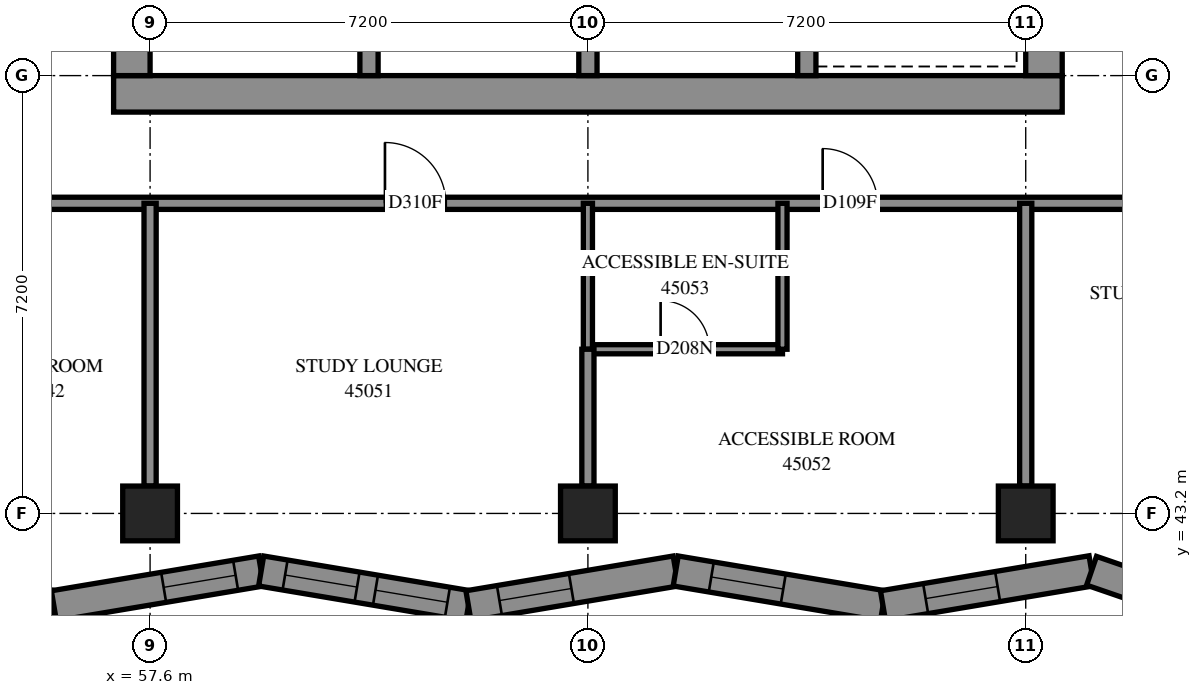
"""IFC4 building model, lengths in metres.
Left out: names, types, materials, properties, quantities, classifications, styles, units other than length and angle.
Written with IfcOpenShell. Run it as: python <this file> out.ifc"""

import sys

from ifc_helpers import new_model, si_unit, direction, frame, frame_2d, origin, origin_2d, place, context, subcontext, project, spatial, polyline, rectangle, outline, extrude, element, fill, save


model = new_model("IFC4")
c1 = context("Model", 3, precision=1e-05, world=origin(), true_north=direction((0.0, 1.0)))
c2 = subcontext(c1, "Body", "Model", "MODEL_VIEW")
j1 = project(units=[si_unit("LENGTHUNIT", "METRE"), si_unit("PLANEANGLEUNIT", "RADIAN")], contexts=[c1])
p1 = place(None, origin())
s1 = spatial("IfcSite", under=j1, at=p1, CompositionType="ELEMENT")
p2 = place(p1, origin())
s2 = spatial("IfcBuilding", under=s1, at=p2, CompositionType="ELEMENT")
p3 = place(p2, frame((0.0, 0.0, 166.0)))
s3 = spatial("IfcBuildingStorey", under=s2, at=p3, CompositionType="ELEMENT", Elevation=166.0)
for number, where, z_axis, x_axis in (
    (1, (57.6, 43.2, 0.0), (0.0, 0.0, 1.0), (1.0, 0.0, 0.0)),
    (2, (64.8, 43.2, 0.0), (0.0, 0.0, 1.0), (1.0, 0.0, 0.0)),
    (3, (72.0, 43.2, 0.0), (0.0, 0.0, 1.0), (1.0, 0.0, 0.0)),
):
    element("IfcColumn", number, at=place(p3, frame(where, z_axis=z_axis, x_axis=x_axis)), inside=s3, PredefinedType="COLUMN", context=c2, shape_type="SweptSolid", body=[
        extrude(rectangle(XDim=0.9, YDim=0.9, at=origin_2d()), origin(), (0.0, 0.0, 1.0), 3.1),
    ])
p4 = place(p3, frame((57.0, 50.1, -0.3), z_axis=(0.0, 0.0, 1.0), x_axis=(1.0, 0.0, 0.0)))
e4 = element("IfcWall", 4, at=p4, inside=s3, PredefinedType="SHEAR", context=c2, shape_type="SweptSolid", body=[
    extrude(rectangle(XDim=15.6, YDim=0.6, at=frame_2d((7.8, 0.0))), origin(), (0.0, 0.0, 1.0), 2.7),
])
p5 = place(p3, frame((57.3, 50.4, -0.3), z_axis=(0.0, 0.0, 1.0), x_axis=(0.0, 1.0, 0.0)))
e5 = element("IfcWall", 5, at=p5, inside=s3, PredefinedType="SHEAR", context=c2, shape_type="SweptSolid", body=[
    extrude(rectangle(XDim=14.4, YDim=0.6, at=frame_2d((7.2, 0.0))), origin(), (0.0, 0.0, 1.0), 2.7),
])
p6 = place(p5, frame((4.55, 0.0, 0.3)))
e6 = element("IfcOpeningElement", 6, at=p6, cuts=e5, PredefinedType="OPENING", context=c2, shape_type="SweptSolid", body=[
    extrude(rectangle(XDim=1.1, YDim=2.1, at=frame_2d((0.55, 1.05))), frame((0.0, 0.31, 0.0), z_axis=(0.0, -1.0, 0.0), x_axis=(1.0, 0.0, 0.0)), (0.0, 0.0, 1.0), 0.62),
])
p7 = place(p5, frame((11.35, 0.0, 0.3)))
e7 = element("IfcOpeningElement", 7, at=p7, cuts=e5, PredefinedType="OPENING", context=c2, shape_type="SweptSolid", body=[
    extrude(rectangle(XDim=1.1, YDim=2.1, at=frame_2d((0.55, 1.05))), frame((0.0, 0.31, 0.0), z_axis=(0.0, -1.0, 0.0), x_axis=(1.0, 0.0, 0.0)), (0.0, 0.0, 1.0), 0.62),
])
p8 = place(p3, frame((72.3, 50.4, -0.3), z_axis=(0.0, 0.0, 1.0), x_axis=(0.0, 1.0, 0.0)))
e8 = element("IfcWall", 8, at=p8, inside=s3, PredefinedType="SHEAR", context=c2, shape_type="SweptSolid", body=[
    extrude(rectangle(XDim=14.4, YDim=0.6, at=frame_2d((7.2, 0.0))), origin(), (0.0, 0.0, 1.0), 2.7),
])
p9 = place(p8, frame((4.55, 0.0, 0.3)))
e9 = element("IfcOpeningElement", 9, at=p9, cuts=e8, PredefinedType="OPENING", context=c2, shape_type="SweptSolid", body=[
    extrude(rectangle(XDim=1.1, YDim=2.1, at=frame_2d((0.55, 1.05))), frame((0.0, 0.31, 0.0), z_axis=(0.0, -1.0, 0.0), x_axis=(1.0, 0.0, 0.0)), (0.0, 0.0, 1.0), 0.62),
])
p10 = place(p8, frame((11.35, 0.0, 0.3)))
e10 = element("IfcOpeningElement", 10, at=p10, cuts=e8, PredefinedType="OPENING", context=c2, shape_type="SweptSolid", body=[
    extrude(rectangle(XDim=1.1, YDim=2.1, at=frame_2d((0.55, 1.05))), frame((0.0, 0.31, 0.0), z_axis=(0.0, -1.0, 0.0), x_axis=(1.0, 0.0, 0.0)), (0.0, 0.0, 1.0), 0.62),
])
for number, where, z_axis, x_axis in (
    (11, (61.2, 50.4, 0.0), (0.0, 0.0, 1.0), (0.0, 1.0, 0.0)),
    (12, (64.8, 50.4, 0.0), (0.0, 0.0, 1.0), (0.0, 1.0, 0.0)),
    (13, (68.4, 50.4, 0.0), (0.0, 0.0, 1.0), (0.0, 1.0, 0.0)),
):
    element("IfcWall", number, at=place(p3, frame(where, z_axis=z_axis, x_axis=x_axis)), inside=s3, PredefinedType="SOLIDWALL", context=c2, shape_type="SweptSolid", body=[
        extrude(rectangle(XDim=3.3, YDim=0.3, at=frame_2d((1.65, 0.0))), origin(), (0.0, 0.0, 1.0), 3.1),
    ])
p11 = place(p3, frame((52.588, 42.257, 0.0), z_axis=(0.0, 0.0, 1.0), x_axis=(0.9862099159, -0.16549925, 0.0)))
e14 = element("IfcWall", 14, at=p11, inside=s3, PredefinedType="SOLIDWALL", context=c2, shape_type="SweptSolid", body=[
    extrude(outline(polyline([(0.064, -0.25), (3.52, -0.25), (3.436, 0.25), (-0.064, 0.25), (0.064, -0.25)])), origin(), (0.0, 0.0, 1.0), 3.1),
])
p12 = place(p11, frame((1.734, 0.0, 0.45)))
e15 = element("IfcOpeningElement", 15, at=p12, cuts=e14, PredefinedType="OPENING", context=c2, shape_type="SweptSolid", body=[
    extrude(rectangle(XDim=1.2, YDim=2.5, at=frame_2d((0.6, 1.25))), frame((0.0, 0.26, 0.0), z_axis=(0.0, -1.0, 0.0), x_axis=(1.0, 0.0, 0.0)), (0.0, 0.0, 1.0), 0.52),
])
p13 = place(p3, frame((56.018, 41.681, 0.0), z_axis=(0.0, 0.0, 1.0), x_axis=(0.9862119159, 0.1654873316, 0.0)))
e16 = element("IfcWall", 16, at=p13, inside=s3, PredefinedType="SOLIDWALL", context=c2, shape_type="SweptSolid", body=[
    extrude(outline(polyline([(-0.042, -0.25), (3.414, -0.25), (3.498, 0.25), (0.042, 0.25), (-0.042, -0.25)])), origin(), (0.0, 0.0, 1.0), 3.1),
])
p14 = place(p13, frame((1.831, 0.0, 0.45)))
e17 = element("IfcOpeningElement", 17, at=p14, cuts=e16, PredefinedType="OPENING", context=c2, shape_type="SweptSolid", body=[
    extrude(rectangle(XDim=1.2, YDim=2.5, at=frame_2d((0.6, 1.25))), frame((0.0, 0.26, 0.0), z_axis=(0.0, -1.0, 0.0), x_axis=(1.0, 0.0, 0.0)), (0.0, 0.0, 1.0), 0.52),
])
p15 = place(p3, frame((59.426, 42.254, 0.0), z_axis=(0.0, 0.0, 1.0), x_axis=(0.9862119159, -0.1654873316, 0.0)))
e18 = element("IfcWall", 18, at=p15, inside=s3, PredefinedType="SOLIDWALL", context=c2, shape_type="SweptSolid", body=[
    extrude(outline(polyline([(0.042, -0.25), (3.498, -0.25), (3.414, 0.25), (-0.042, 0.25), (0.042, -0.25)])), origin(), (0.0, 0.0, 1.0), 3.1),
])
p16 = place(p15, frame((0.399, 0.0, 0.45)))
e19 = element("IfcOpeningElement", 19, at=p16, cuts=e18, PredefinedType="OPENING", context=c2, shape_type="SweptSolid", body=[
    extrude(rectangle(XDim=1.2, YDim=2.5, at=frame_2d((0.6, 1.25))), frame((0.0, 0.26, 0.0), z_axis=(0.0, -1.0, 0.0), x_axis=(1.0, 0.0, 0.0)), (0.0, 0.0, 1.0), 0.52),
])
p17 = place(p15, frame((1.906, 0.0, 0.45)))
e20 = element("IfcOpeningElement", 20, at=p17, cuts=e18, PredefinedType="OPENING", context=c2, shape_type="SweptSolid", body=[
    extrude(rectangle(XDim=1.2, YDim=2.5, at=frame_2d((0.6, 1.25))), frame((0.0, 0.26, 0.0), z_axis=(0.0, -1.0, 0.0), x_axis=(1.0, 0.0, 0.0)), (0.0, 0.0, 1.0), 0.52),
])
p18 = place(p3, frame((62.835, 41.681, 0.0), z_axis=(0.0, 0.0, 1.0), x_axis=(0.9862119159, 0.1654873316, 0.0)))
e21 = element("IfcWall", 21, at=p18, inside=s3, PredefinedType="SOLIDWALL", context=c2, shape_type="SweptSolid", body=[
    extrude(outline(polyline([(-0.042, -0.25), (3.414, -0.25), (3.498, 0.25), (0.042, 0.25), (-0.042, -0.25)])), origin(), (0.0, 0.0, 1.0), 3.1),
])
p19 = place(p18, frame((0.517, 0.0, 0.45)))
e22 = element("IfcOpeningElement", 22, at=p19, cuts=e21, PredefinedType="OPENING", context=c2, shape_type="SweptSolid", body=[
    extrude(rectangle(XDim=1.2, YDim=2.5, at=frame_2d((0.6, 1.25))), frame((0.0, 0.26, 0.0), z_axis=(0.0, -1.0, 0.0), x_axis=(1.0, 0.0, 0.0)), (0.0, 0.0, 1.0), 0.52),
])
p20 = place(p3, frame((66.244, 42.254, 0.0), z_axis=(0.0, 0.0, 1.0), x_axis=(0.9862119159, -0.1654873316, 0.0)))
e23 = element("IfcWall", 23, at=p20, inside=s3, PredefinedType="SOLIDWALL", context=c2, shape_type="SweptSolid", body=[
    extrude(outline(polyline([(0.042, -0.25), (3.498, -0.25), (3.414, 0.25), (-0.042, 0.25), (0.042, -0.25)])), origin(), (0.0, 0.0, 1.0), 3.1),
])
p21 = place(p20, frame((0.593, 0.0, 0.45)))
e24 = element("IfcOpeningElement", 24, at=p21, cuts=e23, PredefinedType="OPENING", context=c2, shape_type="SweptSolid", body=[
    extrude(rectangle(XDim=1.2, YDim=2.5, at=frame_2d((0.6, 1.25))), frame((0.0, 0.26, 0.0), z_axis=(0.0, -1.0, 0.0), x_axis=(1.0, 0.0, 0.0)), (0.0, 0.0, 1.0), 0.52),
])
p22 = place(p3, frame((69.653, 41.681, 0.0), z_axis=(0.0, 0.0, 1.0), x_axis=(0.9862107034, 0.1654945573, 0.0)))
e25 = element("IfcWall", 25, at=p22, inside=s3, PredefinedType="SOLIDWALL", context=c2, shape_type="SweptSolid", body=[
    extrude(outline(polyline([(-0.042, -0.25), (3.414, -0.25), (3.542, 0.25), (0.042, 0.25), (-0.042, -0.25)])), origin(), (0.0, 0.0, 1.0), 3.1),
])
p23 = place(p22, frame((0.711, 0.0, 0.45)))
e26 = element("IfcOpeningElement", 26, at=p23, cuts=e25, PredefinedType="OPENING", context=c2, shape_type="SweptSolid", body=[
    extrude(rectangle(XDim=1.2, YDim=2.5, at=frame_2d((0.6, 1.25))), frame((0.0, 0.26, 0.0), z_axis=(0.0, -1.0, 0.0), x_axis=(1.0, 0.0, 0.0)), (0.0, 0.0, 1.0), 0.52),
])
p24 = place(p3, frame((73.083, 42.257, 0.0), z_axis=(0.0, 0.0, 1.0), x_axis=(0.9456655076, -0.3251411198, 0.0)))
e27 = element("IfcWall", 27, at=p24, inside=s3, PredefinedType="SOLIDWALL", context=c2, shape_type="SweptSolid", body=[
    extrude(outline(polyline([(0.064, -0.25), (3.668, -0.25), (3.711, 0.25), (-0.064, 0.25), (0.064, -0.25)])), origin(), (0.0, 0.0, 1.0), 3.1),
])
p25 = place(p24, frame((0.831, 0.0, 0.45)))
e28 = element("IfcOpeningElement", 28, at=p25, cuts=e27, PredefinedType="OPENING", context=c2, shape_type="SweptSolid", body=[
    extrude(rectangle(XDim=1.2, YDim=2.5, at=frame_2d((0.6, 1.25))), frame((0.0, 0.26, 0.0), z_axis=(0.0, -1.0, 0.0), x_axis=(1.0, 0.0, 0.0)), (0.0, 0.0, 1.0), 0.52),
])
p26 = place(p3, frame((55.5, 48.3, 0.0), z_axis=(0.0, 0.0, 1.0), x_axis=(1.0, 0.0, 0.0)))
e29 = element("IfcWall", 29, at=p26, inside=s3, PredefinedType="PARTITIONING", context=c2, shape_type="SweptSolid", body=[
    extrude(rectangle(XDim=18.974, YDim=0.2, at=frame_2d((9.487, 0.0))), origin(), (0.0, 0.0, 1.0), 3.1),
])
p27 = place(p26, frame((5.963, 0.0, 0.0)))
e30 = element("IfcOpeningElement", 30, at=p27, cuts=e29, PredefinedType="OPENING", context=c2, shape_type="SweptSolid", body=[
    extrude(rectangle(XDim=1.0, YDim=2.1, at=frame_2d((0.5, 1.05))), frame((0.0, 0.11, 0.0), z_axis=(0.0, -1.0, 0.0), x_axis=(1.0, 0.0, 0.0)), (0.0, 0.0, 1.0), 0.22),
])
p28 = place(p26, frame((13.161, 0.0, 0.0)))
e31 = element("IfcOpeningElement", 31, at=p28, cuts=e29, PredefinedType="OPENING", context=c2, shape_type="SweptSolid", body=[
    extrude(rectangle(XDim=0.9, YDim=2.1, at=frame_2d((0.45, 1.05))), frame((0.0, 0.11, 0.0), z_axis=(0.0, -1.0, 0.0), x_axis=(1.0, 0.0, 0.0)), (0.0, 0.0, 1.0), 0.22),
])
for number, where, z_axis, x_axis in (
    (32, (57.6, 43.65, 0.0), (0.0, 0.0, 1.0), (0.0, 1.0, 0.0)),
    (33, (72.0, 43.65, 0.0), (0.0, 0.0, 1.0), (0.0, 1.0, 0.0)),
):
    element("IfcWall", number, at=place(p3, frame(where, z_axis=z_axis, x_axis=x_axis)), inside=s3, PredefinedType="PARTITIONING", context=c2, shape_type="SweptSolid", body=[
        extrude(rectangle(XDim=4.65, YDim=0.2, at=frame_2d((2.325, 0.0))), origin(), (0.0, 0.0, 1.0), 3.1),
    ])
p29 = place(p3, frame((64.8, 45.9, 0.0), z_axis=(0.0, 0.0, 1.0), x_axis=(1.0, 0.0, 0.0)))
e34 = element("IfcWall", 34, at=p29, inside=s3, PredefinedType="PARTITIONING", context=c2, shape_type="SweptSolid", body=[
    extrude(rectangle(XDim=3.2, YDim=0.15, at=frame_2d((1.6, 0.0))), origin(), (0.0, 0.0, 1.0), 3.1),
])
p30 = place(p29, frame((1.196, 0.0, 0.0)))
e35 = element("IfcOpeningElement", 35, at=p30, cuts=e34, PredefinedType="OPENING", context=c2, shape_type="SweptSolid", body=[
    extrude(rectangle(XDim=0.8, YDim=2.1, at=frame_2d((0.4, 1.05))), frame((0.0, 0.085, 0.0), z_axis=(0.0, -1.0, 0.0), x_axis=(1.0, 0.0, 0.0)), (0.0, 0.0, 1.0), 0.17),
])
for number, where, z_axis, x_axis in (
    (36, (68.0, 45.9, 0.0), (0.0, 0.0, 1.0), (0.0, 1.0, 0.0)),
    (37, (64.8, 45.9, 0.0), (0.0, 0.0, 1.0), (0.0, 1.0, 0.0)),
):
    element("IfcWall", number, at=place(p3, frame(where, z_axis=z_axis, x_axis=x_axis)), inside=s3, PredefinedType="PARTITIONING", context=c2, shape_type="SweptSolid", body=[
        extrude(rectangle(XDim=2.4, YDim=0.15, at=frame_2d((1.2, 0.0))), origin(), (0.0, 0.0, 1.0), 3.1),
    ])
p31 = place(p3, frame((64.8, 43.65, 0.0), z_axis=(0.0, 0.0, 1.0), x_axis=(0.0, 1.0, 0.0)))
e38 = element("IfcWall", 38, at=p31, inside=s3, PredefinedType="PARTITIONING", context=c2, shape_type="SweptSolid", body=[
    extrude(rectangle(XDim=2.25, YDim=0.2, at=frame_2d((1.125, 0.0))), origin(), (0.0, 0.0, 1.0), 3.1),
])
p32 = place(p14, origin())
e39 = element("IfcWindow", 39, at=p32, inside=s3, PartitioningType="SINGLE_PANEL", PredefinedType="WINDOW", context=c2, shape_type="SweptSolid", body=[
    extrude(rectangle(XDim=1.2, YDim=2.5, at=frame_2d((0.6, 1.25))), frame((0.0, 0.18, 0.0), z_axis=(0.0, -1.0, 0.0), x_axis=(1.0, 0.0, 0.0)), (0.0, 0.0, 1.0), 0.06),
])
fill(e17, e39)
p33 = place(p16, origin())
e40 = element("IfcWindow", 40, at=p33, inside=s3, PartitioningType="SINGLE_PANEL", PredefinedType="WINDOW", context=c2, shape_type="SweptSolid", body=[
    extrude(rectangle(XDim=1.2, YDim=2.5, at=frame_2d((0.6, 1.25))), frame((0.0, 0.18, 0.0), z_axis=(0.0, -1.0, 0.0), x_axis=(1.0, 0.0, 0.0)), (0.0, 0.0, 1.0), 0.06),
])
fill(e19, e40)
p34 = place(p17, origin())
e41 = element("IfcWindow", 41, at=p34, inside=s3, PartitioningType="SINGLE_PANEL", PredefinedType="WINDOW", context=c2, shape_type="SweptSolid", body=[
    extrude(rectangle(XDim=1.2, YDim=2.5, at=frame_2d((0.6, 1.25))), frame((0.0, 0.18, 0.0), z_axis=(0.0, -1.0, 0.0), x_axis=(1.0, 0.0, 0.0)), (0.0, 0.0, 1.0), 0.06),
])
fill(e20, e41)
p35 = place(p19, origin())
e42 = element("IfcWindow", 42, at=p35, inside=s3, PartitioningType="SINGLE_PANEL", PredefinedType="WINDOW", context=c2, shape_type="SweptSolid", body=[
    extrude(rectangle(XDim=1.2, YDim=2.5, at=frame_2d((0.6, 1.25))), frame((0.0, 0.18, 0.0), z_axis=(0.0, -1.0, 0.0), x_axis=(1.0, 0.0, 0.0)), (0.0, 0.0, 1.0), 0.06),
])
fill(e22, e42)
p36 = place(p21, origin())
e43 = element("IfcWindow", 43, at=p36, inside=s3, PartitioningType="SINGLE_PANEL", PredefinedType="WINDOW", context=c2, shape_type="SweptSolid", body=[
    extrude(rectangle(XDim=1.2, YDim=2.5, at=frame_2d((0.6, 1.25))), frame((0.0, 0.18, 0.0), z_axis=(0.0, -1.0, 0.0), x_axis=(1.0, 0.0, 0.0)), (0.0, 0.0, 1.0), 0.06),
])
fill(e24, e43)
p37 = place(p23, origin())
e44 = element("IfcWindow", 44, at=p37, inside=s3, PartitioningType="SINGLE_PANEL", PredefinedType="WINDOW", context=c2, shape_type="SweptSolid", body=[
    extrude(rectangle(XDim=1.2, YDim=2.5, at=frame_2d((0.6, 1.25))), frame((0.0, 0.18, 0.0), z_axis=(0.0, -1.0, 0.0), x_axis=(1.0, 0.0, 0.0)), (0.0, 0.0, 1.0), 0.06),
])
fill(e26, e44)
p38 = place(p27, origin())
e45 = element("IfcDoor", 45, at=p38, inside=s3, OperationType="SINGLE_SWING_LEFT", PredefinedType="DOOR", context=c2, shape_type="SweptSolid", body=[
    extrude(rectangle(XDim=1.0, YDim=2.1, at=frame_2d((0.5, 1.05))), frame((0.0, 0.025, 0.0), z_axis=(0.0, -1.0, 0.0), x_axis=(1.0, 0.0, 0.0)), (0.0, 0.0, 1.0), 0.05),
])
fill(e30, e45)
p39 = place(p28, origin())
e46 = element("IfcDoor", 46, at=p39, inside=s3, OperationType="SINGLE_SWING_LEFT", PredefinedType="DOOR", context=c2, shape_type="SweptSolid", body=[
    extrude(rectangle(XDim=0.9, YDim=2.1, at=frame_2d((0.45, 1.05))), frame((0.0, 0.025, 0.0), z_axis=(0.0, -1.0, 0.0), x_axis=(1.0, 0.0, 0.0)), (0.0, 0.0, 1.0), 0.05),
])
fill(e31, e46)
p40 = place(p30, origin())
e47 = element("IfcDoor", 47, at=p40, inside=s3, OperationType="SINGLE_SWING_RIGHT", PredefinedType="DOOR", context=c2, shape_type="SweptSolid", body=[
    extrude(rectangle(XDim=0.8, YDim=2.1, at=frame_2d((0.4, 1.05))), frame((0.0, 0.025, 0.0), z_axis=(0.0, -1.0, 0.0), x_axis=(1.0, 0.0, 0.0)), (0.0, 0.0, 1.0), 0.05),
])
fill(e35, e47)
save(model, sys.argv[1])
